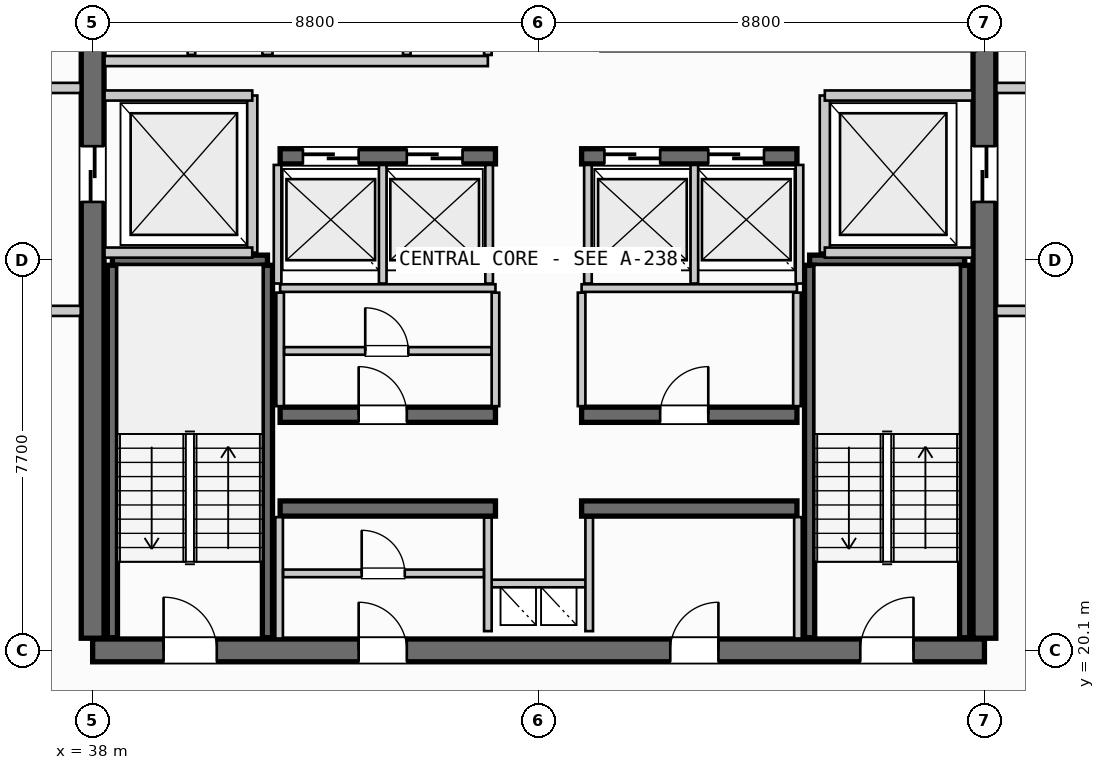
"""IFC4 building model, lengths in metres.
Left out: names, types, materials, properties, quantities, classifications, styles, units other than length and angle.
Written with IfcOpenShell. Run it as: python <this file> out.ifc"""

import sys

from ifc_helpers import new_model, si_unit, direction, frame, frame_2d, origin, place, context, subcontext, project, spatial, rectangle, extrude, source, transform, mapped, element, fill, save


model = new_model("IFC4")
c1 = context("Model", 3, precision=1e-05, world=origin(), true_north=direction((0.0, 1.0)))
c2 = subcontext(c1, "Body", "Model", "MODEL_VIEW")
j1 = project(units=[si_unit("LENGTHUNIT", "METRE"), si_unit("PLANEANGLEUNIT", "RADIAN")], contexts=[c1])
p1 = place(None, origin())
s1 = spatial("IfcSite", under=j1, at=p1, CompositionType="ELEMENT")
p2 = place(p1, origin())
s2 = spatial("IfcBuilding", under=s1, at=p2, CompositionType="ELEMENT")
p3 = place(p2, frame((0.0, 0.0, 273.25)))
s3 = spatial("IfcBuildingStorey", under=s2, at=p3, CompositionType="ELEMENT", Elevation=273.25)
p4 = place(p3, frame((38.0, 20.1, 0.0), z_axis=(0.0, 0.0, 1.0), x_axis=(1.0, 0.0, 0.0)))
e1 = element("IfcWall", 1, at=p4, inside=s3, PredefinedType="SHEAR", context=c2, shape_type="SweptSolid", body=[
    extrude(rectangle(XDim=17.6, YDim=0.45, at=frame_2d((8.8, 0.0))), origin(), (0.0, 0.0, 1.0), 3.21),
])
p5 = place(p4, frame((1.4, 0.0, 0.0)))
e2 = element("IfcOpeningElement", 2, at=p5, cuts=e1, PredefinedType="OPENING", context=c2, shape_type="SweptSolid", body=[
    extrude(rectangle(XDim=1.05, YDim=2.15, at=frame_2d((0.525, 1.075))), frame((0.0, 0.235, 0.0), z_axis=(0.0, -1.0, 0.0), x_axis=(1.0, 0.0, 0.0)), (0.0, 0.0, 1.0), 0.47),
])
p6 = place(p4, frame((15.15, 0.0, 0.0)))
e3 = element("IfcOpeningElement", 3, at=p6, cuts=e1, PredefinedType="OPENING", context=c2, shape_type="SweptSolid", body=[
    extrude(rectangle(XDim=1.05, YDim=2.15, at=frame_2d((0.525, 1.075))), frame((0.0, 0.235, 0.0), z_axis=(0.0, -1.0, 0.0), x_axis=(1.0, 0.0, 0.0)), (0.0, 0.0, 1.0), 0.47),
])
p7 = place(p4, frame((5.25, 0.0, 0.0)))
e4 = element("IfcOpeningElement", 4, at=p7, cuts=e1, PredefinedType="OPENING", context=c2, shape_type="SweptSolid", body=[
    extrude(rectangle(XDim=0.95, YDim=2.15, at=frame_2d((0.475, 1.075))), frame((0.0, 0.235, 0.0), z_axis=(0.0, -1.0, 0.0), x_axis=(1.0, 0.0, 0.0)), (0.0, 0.0, 1.0), 0.47),
])
p8 = place(p4, frame((11.4, 0.0, 0.0)))
e5 = element("IfcOpeningElement", 5, at=p8, cuts=e1, PredefinedType="OPENING", context=c2, shape_type="SweptSolid", body=[
    extrude(rectangle(XDim=0.95, YDim=2.15, at=frame_2d((0.475, 1.075))), frame((0.0, 0.235, 0.0), z_axis=(0.0, -1.0, 0.0), x_axis=(1.0, 0.0, 0.0)), (0.0, 0.0, 1.0), 0.47),
])
p9 = place(p3, frame((38.0, 35.26, 0.0), z_axis=(0.0, 0.0, 1.0), x_axis=(0.0, -1.0, 0.0)))
e6 = element("IfcWall", 6, at=p9, inside=s3, PredefinedType="SHEAR", context=c2, shape_type="SweptSolid", body=[
    extrude(rectangle(XDim=14.92, YDim=0.45, at=frame_2d((7.46, 0.0))), origin(), (0.0, 0.0, 1.0), 3.21),
])
p10 = place(p9, frame((5.21, 0.0, 0.0)))
e7 = element("IfcOpeningElement", 7, at=p10, cuts=e6, PredefinedType="OPENING", context=c2, shape_type="SweptSolid", body=[
    extrude(rectangle(XDim=1.1, YDim=2.2, at=frame_2d((0.55, 1.1))), frame((0.0, 0.235, 0.0), z_axis=(0.0, -1.0, 0.0), x_axis=(1.0, 0.0, 0.0)), (0.0, 0.0, 1.0), 0.47),
])
p11 = place(p3, frame((55.6, 20.34, 0.0), z_axis=(0.0, 0.0, 1.0), x_axis=(0.0, 1.0, 0.0)))
e8 = element("IfcWall", 8, at=p11, inside=s3, PredefinedType="SHEAR", context=c2, shape_type="SweptSolid", body=[
    extrude(rectangle(XDim=14.92, YDim=0.45, at=frame_2d((7.46, 0.0))), origin(), (0.0, 0.0, 1.0), 3.21),
])
p12 = place(p11, frame((12.71, 0.0, 0.0)))
e9 = element("IfcOpeningElement", 9, at=p12, cuts=e8, PredefinedType="OPENING", context=c2, shape_type="SweptSolid", body=[
    extrude(rectangle(XDim=1.05, YDim=2.15, at=frame_2d((0.525, 1.075))), frame((0.0, 0.235, 0.0), z_axis=(0.0, -1.0, 0.0), x_axis=(1.0, 0.0, 0.0)), (0.0, 0.0, 1.0), 0.47),
])
p13 = place(p11, frame((8.61, 0.0, 0.0)))
e10 = element("IfcOpeningElement", 10, at=p13, cuts=e8, PredefinedType="OPENING", context=c2, shape_type="SweptSolid", body=[
    extrude(rectangle(XDim=1.1, YDim=2.2, at=frame_2d((0.55, 1.1))), frame((0.0, 0.235, 0.0), z_axis=(0.0, -1.0, 0.0), x_axis=(1.0, 0.0, 0.0)), (0.0, 0.0, 1.0), 0.47),
])
for number, where, z_axis, x_axis in (
    (11, (41.7, 22.9, 0.0), (0.0, 0.0, 1.0), (1.0, 0.0, 0.0)),
    (12, (47.65, 22.9, 0.0), (0.0, 0.0, 1.0), (1.0, 0.0, 0.0)),
):
    element("IfcWall", number, at=place(p3, frame(where, z_axis=z_axis, x_axis=x_axis)), inside=s3, PredefinedType="SHEAR", context=c2, shape_type="SweptSolid", body=[
        extrude(rectangle(XDim=4.25, YDim=0.3, at=frame_2d((2.125, 0.0))), origin(), (0.0, 0.0, 1.0), 3.21),
    ])
p14 = place(p3, frame((41.7, 24.75, 0.0), z_axis=(0.0, 0.0, 1.0), x_axis=(1.0, 0.0, 0.0)))
e13 = element("IfcWall", 13, at=p14, inside=s3, PredefinedType="SHEAR", context=c2, shape_type="SweptSolid", body=[
    extrude(rectangle(XDim=4.25, YDim=0.3, at=frame_2d((2.125, 0.0))), origin(), (0.0, 0.0, 1.0), 3.21),
])
p15 = place(p14, frame((1.55, 0.0, 0.0)))
e14 = element("IfcOpeningElement", 14, at=p15, cuts=e13, PredefinedType="OPENING", context=c2, shape_type="SweptSolid", body=[
    extrude(rectangle(XDim=0.95, YDim=2.15, at=frame_2d((0.475, 1.075))), frame((0.0, 0.16, 0.0), z_axis=(0.0, -1.0, 0.0), x_axis=(1.0, 0.0, 0.0)), (0.0, 0.0, 1.0), 0.32),
])
p16 = place(p3, frame((47.65, 24.75, 0.0), z_axis=(0.0, 0.0, 1.0), x_axis=(1.0, 0.0, 0.0)))
e15 = element("IfcWall", 15, at=p16, inside=s3, PredefinedType="SHEAR", context=c2, shape_type="SweptSolid", body=[
    extrude(rectangle(XDim=4.25, YDim=0.3, at=frame_2d((2.125, 0.0))), origin(), (0.0, 0.0, 1.0), 3.21),
])
p17 = place(p16, frame((1.55, 0.0, 0.0)))
e16 = element("IfcOpeningElement", 16, at=p17, cuts=e15, PredefinedType="OPENING", context=c2, shape_type="SweptSolid", body=[
    extrude(rectangle(XDim=0.95, YDim=2.15, at=frame_2d((0.475, 1.075))), frame((0.0, 0.16, 0.0), z_axis=(0.0, -1.0, 0.0), x_axis=(1.0, 0.0, 0.0)), (0.0, 0.0, 1.0), 0.32),
])
p18 = place(p3, frame((41.7, 29.85, 0.0), z_axis=(0.0, 0.0, 1.0), x_axis=(1.0, 0.0, 0.0)))
e17 = element("IfcWall", 17, at=p18, inside=s3, PredefinedType="SHEAR", context=c2, shape_type="SweptSolid", body=[
    extrude(rectangle(XDim=4.25, YDim=0.3, at=frame_2d((2.125, 0.0))), origin(), (0.0, 0.0, 1.0), 3.21),
])
p19 = place(p18, frame((0.45, 0.0, 0.0)))
e18 = element("IfcOpeningElement", 18, at=p19, cuts=e17, PredefinedType="OPENING", context=c2, shape_type="SweptSolid", body=[
    extrude(rectangle(XDim=1.1, YDim=2.2, at=frame_2d((0.55, 1.1))), frame((0.0, 0.16, 0.0), z_axis=(0.0, -1.0, 0.0), x_axis=(1.0, 0.0, 0.0)), (0.0, 0.0, 1.0), 0.32),
])
p20 = place(p18, frame((2.5, 0.0, 0.0)))
e19 = element("IfcOpeningElement", 19, at=p20, cuts=e17, PredefinedType="OPENING", context=c2, shape_type="SweptSolid", body=[
    extrude(rectangle(XDim=1.1, YDim=2.2, at=frame_2d((0.55, 1.1))), frame((0.0, 0.16, 0.0), z_axis=(0.0, -1.0, 0.0), x_axis=(1.0, 0.0, 0.0)), (0.0, 0.0, 1.0), 0.32),
])
p21 = place(p3, frame((47.65, 29.85, 0.0), z_axis=(0.0, 0.0, 1.0), x_axis=(1.0, 0.0, 0.0)))
e20 = element("IfcWall", 20, at=p21, inside=s3, PredefinedType="SHEAR", context=c2, shape_type="SweptSolid", body=[
    extrude(rectangle(XDim=4.25, YDim=0.3, at=frame_2d((2.125, 0.0))), origin(), (0.0, 0.0, 1.0), 3.21),
])
p22 = place(p21, frame((0.45, 0.0, 0.0)))
e21 = element("IfcOpeningElement", 21, at=p22, cuts=e20, PredefinedType="OPENING", context=c2, shape_type="SweptSolid", body=[
    extrude(rectangle(XDim=1.1, YDim=2.2, at=frame_2d((0.55, 1.1))), frame((0.0, 0.16, 0.0), z_axis=(0.0, -1.0, 0.0), x_axis=(1.0, 0.0, 0.0)), (0.0, 0.0, 1.0), 0.32),
])
p23 = place(p21, frame((2.5, 0.0, 0.0)))
e22 = element("IfcOpeningElement", 22, at=p23, cuts=e20, PredefinedType="OPENING", context=c2, shape_type="SweptSolid", body=[
    extrude(rectangle(XDim=1.1, YDim=2.2, at=frame_2d((0.55, 1.1))), frame((0.0, 0.16, 0.0), z_axis=(0.0, -1.0, 0.0), x_axis=(1.0, 0.0, 0.0)), (0.0, 0.0, 1.0), 0.32),
])
p24 = place(p3, frame((38.39, 27.8, 0.0), z_axis=(0.0, 0.0, 1.0), x_axis=(1.0, 0.0, 0.0)))
e23 = element("IfcWall", 23, at=p24, inside=s3, PredefinedType="SHEAR", context=c2, shape_type="SweptSolid", body=[
    extrude(rectangle(XDim=3.06, YDim=0.2, at=frame_2d((1.53, 0.0))), origin(), (0.0, 0.0, 1.0), 3.21),
])
for number, where, z_axis, x_axis in (
    (24, (41.45, 27.7, 0.0), (0.0, 0.0, 1.0), (0.0, -1.0, 0.0)),
    (25, (38.39, 20.35, 0.0), (0.0, 0.0, 1.0), (0.0, 1.0, 0.0)),
):
    element("IfcWall", number, at=place(p3, frame(where, z_axis=z_axis, x_axis=x_axis)), inside=s3, PredefinedType="SHEAR", context=c2, shape_type="SweptSolid", body=[
        extrude(rectangle(XDim=7.35, YDim=0.2, at=frame_2d((3.675, 0.0))), origin(), (0.0, 0.0, 1.0), 3.21),
    ])
p25 = place(p3, frame((52.15, 27.8, 0.0), z_axis=(0.0, 0.0, 1.0), x_axis=(1.0, 0.0, 0.0)))
e26 = element("IfcWall", 26, at=p25, inside=s3, PredefinedType="SHEAR", context=c2, shape_type="SweptSolid", body=[
    extrude(rectangle(XDim=3.06, YDim=0.2, at=frame_2d((1.53, 0.0))), origin(), (0.0, 0.0, 1.0), 3.21),
])
for number, where, z_axis, x_axis in (
    (27, (55.21, 27.7, 0.0), (0.0, 0.0, 1.0), (0.0, -1.0, 0.0)),
    (28, (52.15, 20.35, 0.0), (0.0, 0.0, 1.0), (0.0, 1.0, 0.0)),
):
    element("IfcWall", number, at=place(p3, frame(where, z_axis=z_axis, x_axis=x_axis)), inside=s3, PredefinedType="SHEAR", context=c2, shape_type="SweptSolid", body=[
        extrude(rectangle(XDim=7.35, YDim=0.2, at=frame_2d((3.675, 0.0))), origin(), (0.0, 0.0, 1.0), 3.21),
    ])
p26 = place(p3, frame((45.8, 21.42, 0.0), z_axis=(0.0, 0.0, 1.0), x_axis=(1.0, 0.0, 0.0)))
e29 = element("IfcWall", 29, at=p26, inside=s3, PredefinedType="PARTITIONING", context=c2, shape_type="SweptSolid", body=[
    extrude(rectangle(XDim=2.0, YDim=0.15, at=frame_2d((1.0, 0.0))), origin(), (0.0, 0.0, 1.0), 2.595),
])
for number, where, z_axis, x_axis in (
    (30, (45.8, 20.48, 0.0), (0.0, 0.0, 1.0), (0.0, 1.0, 0.0)),
    (31, (47.8, 20.48, 0.0), (0.0, 0.0, 1.0), (0.0, 1.0, 0.0)),
):
    element("IfcWall", number, at=place(p3, frame(where, z_axis=z_axis, x_axis=x_axis)), inside=s3, PredefinedType="PARTITIONING", context=c2, shape_type="SweptSolid", body=[
        extrude(rectangle(XDim=2.24, YDim=0.15, at=frame_2d((1.12, 0.0))), origin(), (0.0, 0.0, 1.0), 2.595),
    ])
p27 = place(p3, frame((41.15, 27.95, 0.0), z_axis=(0.0, 0.0, 1.0), x_axis=(0.0, 1.0, 0.0)))
e32 = element("IfcWall", 32, at=p27, inside=s3, PredefinedType="PARTITIONING", context=c2, shape_type="SweptSolid", body=[
    extrude(rectangle(XDim=3.1, YDim=0.2, at=frame_2d((1.55, 0.0))), origin(), (0.0, 0.0, 1.0), 2.595),
])
for number, where, z_axis, x_axis in (
    (33, (38.235, 27.95, 0.0), (0.0, 0.0, 1.0), (1.0, 0.0, 0.0)),
    (34, (38.235, 31.05, 0.0), (0.0, 0.0, 1.0), (1.0, 0.0, 0.0)),
):
    element("IfcWall", number, at=place(p3, frame(where, z_axis=z_axis, x_axis=x_axis)), inside=s3, PredefinedType="PARTITIONING", context=c2, shape_type="SweptSolid", body=[
        extrude(rectangle(XDim=2.915, YDim=0.2, at=frame_2d((1.458, 0.0))), origin(), (0.0, 0.0, 1.0), 2.595),
    ])
for number, where, z_axis, x_axis in (
    (35, (34.5, 26.8, 0.0), (0.0, 0.0, 1.0), (1.0, 0.0, 0.0)),
    (36, (34.5, 31.2, 0.0), (0.0, 0.0, 1.0), (1.0, 0.0, 0.0)),
):
    element("IfcWall", number, at=place(p3, frame(where, z_axis=z_axis, x_axis=x_axis)), inside=s3, PredefinedType="PARTITIONING", context=c2, shape_type="SweptSolid", body=[
        extrude(rectangle(XDim=3.265, YDim=0.2, at=frame_2d((1.632, 0.0))), origin(), (0.0, 0.0, 1.0), 2.595),
    ])
p28 = place(p3, frame((52.45, 27.95, 0.0), z_axis=(0.0, 0.0, 1.0), x_axis=(0.0, 1.0, 0.0)))
e37 = element("IfcWall", 37, at=p28, inside=s3, PredefinedType="PARTITIONING", context=c2, shape_type="SweptSolid", body=[
    extrude(rectangle(XDim=3.1, YDim=0.2, at=frame_2d((1.55, 0.0))), origin(), (0.0, 0.0, 1.0), 2.595),
])
for number, where, z_axis, x_axis in (
    (38, (52.45, 27.95, 0.0), (0.0, 0.0, 1.0), (1.0, 0.0, 0.0)),
    (39, (52.45, 31.05, 0.0), (0.0, 0.0, 1.0), (1.0, 0.0, 0.0)),
):
    element("IfcWall", number, at=place(p3, frame(where, z_axis=z_axis, x_axis=x_axis)), inside=s3, PredefinedType="PARTITIONING", context=c2, shape_type="SweptSolid", body=[
        extrude(rectangle(XDim=2.915, YDim=0.2, at=frame_2d((1.458, 0.0))), origin(), (0.0, 0.0, 1.0), 2.595),
    ])
for number, where, z_axis, x_axis in (
    (40, (55.835, 26.8, 0.0), (0.0, 0.0, 1.0), (1.0, 0.0, 0.0)),
    (41, (55.835, 31.2, 0.0), (0.0, 0.0, 1.0), (1.0, 0.0, 0.0)),
):
    element("IfcWall", number, at=place(p3, frame(where, z_axis=z_axis, x_axis=x_axis)), inside=s3, PredefinedType="PARTITIONING", context=c2, shape_type="SweptSolid", body=[
        extrude(rectangle(XDim=3.265, YDim=0.2, at=frame_2d((1.633, 0.0))), origin(), (0.0, 0.0, 1.0), 2.595),
    ])
for number, where, z_axis, x_axis in (
    (42, (41.68, 20.335, 0.0), (0.0, 0.0, 1.0), (0.0, 1.0, 0.0)),
    (43, (51.92, 20.335, 0.0), (0.0, 0.0, 1.0), (0.0, 1.0, 0.0)),
):
    element("IfcWall", number, at=place(p3, frame(where, z_axis=z_axis, x_axis=x_axis)), inside=s3, PredefinedType="PARTITIONING", context=c2, shape_type="SweptSolid", body=[
        extrude(rectangle(XDim=2.395, YDim=0.15, at=frame_2d((1.198, 0.0))), origin(), (0.0, 0.0, 1.0), 2.595),
    ])
p29 = place(p3, frame((41.76, 21.62, 0.0), z_axis=(0.0, 0.0, 1.0), x_axis=(1.0, 0.0, 0.0)))
e44 = element("IfcWall", 44, at=p29, inside=s3, PredefinedType="PARTITIONING", context=c2, shape_type="SweptSolid", body=[
    extrude(rectangle(XDim=3.96, YDim=0.15, at=frame_2d((1.98, 0.0))), origin(), (0.0, 0.0, 1.0), 2.595),
])
p30 = place(p29, frame((1.55, 0.0, 0.0)))
e45 = element("IfcOpeningElement", 45, at=p30, cuts=e44, PredefinedType="OPENING", context=c2, shape_type="SweptSolid", body=[
    extrude(rectangle(XDim=0.85, YDim=2.15, at=frame_2d((0.425, 1.075))), frame((0.0, 0.085, 0.0), z_axis=(0.0, -1.0, 0.0), x_axis=(1.0, 0.0, 0.0)), (0.0, 0.0, 1.0), 0.17),
])
for number, where, z_axis, x_axis in (
    (46, (41.7, 27.25, 0.0), (0.0, 0.0, 1.0), (1.0, 0.0, 0.0)),
    (47, (47.65, 27.25, 0.0), (0.0, 0.0, 1.0), (1.0, 0.0, 0.0)),
):
    element("IfcWall", number, at=place(p3, frame(where, z_axis=z_axis, x_axis=x_axis)), inside=s3, PredefinedType="PARTITIONING", context=c2, shape_type="SweptSolid", body=[
        extrude(rectangle(XDim=4.25, YDim=0.15, at=frame_2d((2.125, 0.0))), origin(), (0.0, 0.0, 1.0), 2.595),
    ])
for number, where, z_axis, x_axis in (
    (48, (41.7, 24.92, 0.0), (0.0, 0.0, 1.0), (0.0, 1.0, 0.0)),
    (49, (45.95, 24.92, 0.0), (0.0, 0.0, 1.0), (0.0, 1.0, 0.0)),
    (50, (47.65, 24.92, 0.0), (0.0, 0.0, 1.0), (0.0, 1.0, 0.0)),
    (51, (51.9, 24.92, 0.0), (0.0, 0.0, 1.0), (0.0, 1.0, 0.0)),
):
    element("IfcWall", number, at=place(p3, frame(where, z_axis=z_axis, x_axis=x_axis)), inside=s3, PredefinedType="PARTITIONING", context=c2, shape_type="SweptSolid", body=[
        extrude(rectangle(XDim=2.24, YDim=0.15, at=frame_2d((1.12, 0.0))), origin(), (0.0, 0.0, 1.0), 2.595),
    ])
p31 = place(p3, frame((41.78, 26.01, 0.0), z_axis=(0.0, 0.0, 1.0), x_axis=(1.0, 0.0, 0.0)))
e52 = element("IfcWall", 52, at=p31, inside=s3, PredefinedType="PARTITIONING", context=c2, shape_type="SweptSolid", body=[
    extrude(rectangle(XDim=4.09, YDim=0.15, at=frame_2d((2.045, 0.0))), origin(), (0.0, 0.0, 1.0), 2.595),
])
p32 = place(p31, frame((1.6, 0.0, 0.0)))
e53 = element("IfcOpeningElement", 53, at=p32, cuts=e52, PredefinedType="OPENING", context=c2, shape_type="SweptSolid", body=[
    extrude(rectangle(XDim=0.85, YDim=2.15, at=frame_2d((0.425, 1.075))), frame((0.0, 0.085, 0.0), z_axis=(0.0, -1.0, 0.0), x_axis=(1.0, 0.0, 0.0)), (0.0, 0.0, 1.0), 0.17),
])
for number, where, z_axis, x_axis in (
    (54, (41.65, 27.34, 0.0), (0.0, 0.0, 1.0), (0.0, 1.0, 0.0)),
    (55, (43.725, 27.34, 0.0), (0.0, 0.0, 1.0), (0.0, 1.0, 0.0)),
    (56, (45.825, 27.34, 0.0), (0.0, 0.0, 1.0), (0.0, 1.0, 0.0)),
    (57, (47.775, 27.34, 0.0), (0.0, 0.0, 1.0), (0.0, 1.0, 0.0)),
    (58, (49.875, 27.34, 0.0), (0.0, 0.0, 1.0), (0.0, 1.0, 0.0)),
    (59, (51.95, 27.34, 0.0), (0.0, 0.0, 1.0), (0.0, 1.0, 0.0)),
):
    element("IfcWall", number, at=place(p3, frame(where, z_axis=z_axis, x_axis=x_axis)), inside=s3, PredefinedType="PARTITIONING", context=c2, shape_type="SweptSolid", body=[
        extrude(rectangle(XDim=2.34, YDim=0.15, at=frame_2d((1.17, 0.0))), origin(), (0.0, 0.0, 1.0), 2.595),
    ])
p33 = place(p3, frame((41.45, 31.85, 0.0), z_axis=(0.0, 0.0, 1.0), x_axis=(0.0, 1.0, 0.0)))
e60 = element("IfcWall", 60, at=p33, inside=s3, PredefinedType="PARTITIONING", context=c2, shape_type="SweptSolid", body=[
    extrude(rectangle(XDim=3.415, YDim=0.2, at=frame_2d((1.708, 0.0))), origin(), (0.0, 0.0, 1.0), 2.595),
])
p34 = place(p3, frame((38.235, 31.73, 0.0), z_axis=(0.0, 0.0, 1.0), x_axis=(1.0, 0.0, 0.0)))
e61 = element("IfcWall", 61, at=p34, inside=s3, PredefinedType="PARTITIONING", context=c2, shape_type="SweptSolid", body=[
    extrude(rectangle(XDim=7.565, YDim=0.2, at=frame_2d((3.782, 0.0))), origin(), (0.0, 0.0, 1.0), 2.595),
])
for number, where, z_axis, x_axis in (
    (62, (45.8, 31.85, 0.0), (0.0, 0.0, 1.0), (0.0, 1.0, 0.0)),
    (63, (39.95, 31.85, 0.0), (0.0, 0.0, 1.0), (0.0, 1.0, 0.0)),
):
    element("IfcWall", number, at=place(p3, frame(where, z_axis=z_axis, x_axis=x_axis)), inside=s3, PredefinedType="PARTITIONING", context=c2, shape_type="SweptSolid", body=[
        extrude(rectangle(XDim=3.415, YDim=0.15, at=frame_2d((1.708, 0.0))), origin(), (0.0, 0.0, 1.0), 2.595),
    ])
p35 = place(p3, frame((44.2, 31.85, 0.0), z_axis=(0.0, 0.0, 1.0), x_axis=(0.0, 1.0, 0.0)))
e64 = element("IfcWall", 64, at=p35, inside=s3, PredefinedType="PLUMBINGWALL", context=c2, shape_type="SweptSolid", body=[
    extrude(rectangle(XDim=3.415, YDim=0.15, at=frame_2d((1.708, 0.0))), origin(), (0.0, 0.0, 1.0), 2.595),
])
m1 = source(origin(), c2, "Body", "SweptSolid", [
    extrude(rectangle(XDim=1.05, YDim=2.15, at=frame_2d((0.525, 1.075))), frame((0.0, 0.025, 0.0), z_axis=(0.0, -1.0, 0.0), x_axis=(1.0, 0.0, 0.0)), (0.0, 0.0, 1.0), 0.05),
])
p36 = place(p5, origin())
e65 = element("IfcDoor", 65, at=p36, inside=s3, OperationType="SINGLE_SWING_LEFT", PredefinedType="DOOR", context=c2, shape_type="MappedRepresentation", body=[
    mapped(m1, transform((0.0, 0.0, 0.0), scale=1.0)),
])
fill(e2, e65)
p37 = place(p6, origin())
e66 = element("IfcDoor", 66, at=p37, inside=s3, OperationType="SINGLE_SWING_RIGHT", PredefinedType="DOOR", context=c2, shape_type="MappedRepresentation", body=[
    mapped(m1, transform((0.0, 0.0, 0.0), scale=1.0)),
])
fill(e3, e66)
m2 = source(origin(), c2, "Body", "SweptSolid", [
    extrude(rectangle(XDim=1.1, YDim=2.2, at=frame_2d((0.55, 1.1))), frame((0.0, 0.025, 0.0), z_axis=(0.0, -1.0, 0.0), x_axis=(1.0, 0.0, 0.0)), (0.0, 0.0, 1.0), 0.05),
])
p38 = place(p10, origin())
e67 = element("IfcDoor", 67, at=p38, inside=s3, OperationType="SLIDING_TO_LEFT", PredefinedType="DOOR", context=c2, shape_type="MappedRepresentation", body=[
    mapped(m2, transform((0.0, 0.0, 0.0), scale=1.0)),
])
fill(e7, e67)
p39 = place(p13, origin())
e68 = element("IfcDoor", 68, at=p39, inside=s3, OperationType="SLIDING_TO_RIGHT", PredefinedType="DOOR", context=c2, shape_type="MappedRepresentation", body=[
    mapped(m2, transform((0.0, 0.0, 0.0), scale=1.0)),
])
fill(e10, e68)
m3 = source(origin(), c2, "Body", "SweptSolid", [
    extrude(rectangle(XDim=0.95, YDim=2.15, at=frame_2d((0.475, 1.075))), frame((0.0, 0.025, 0.0), z_axis=(0.0, -1.0, 0.0), x_axis=(1.0, 0.0, 0.0)), (0.0, 0.0, 1.0), 0.05),
])
p40 = place(p7, origin())
e69 = element("IfcDoor", 69, at=p40, inside=s3, OperationType="SINGLE_SWING_LEFT", PredefinedType="DOOR", context=c2, shape_type="MappedRepresentation", body=[
    mapped(m3, transform((0.0, 0.0, 0.0), scale=1.0)),
])
fill(e4, e69)
p41 = place(p8, origin())
e70 = element("IfcDoor", 70, at=p41, inside=s3, OperationType="SINGLE_SWING_RIGHT", PredefinedType="DOOR", context=c2, shape_type="MappedRepresentation", body=[
    mapped(m3, transform((0.0, 0.0, 0.0), scale=1.0)),
])
fill(e5, e70)
p42 = place(p15, origin())
e71 = element("IfcDoor", 71, at=p42, inside=s3, OperationType="SINGLE_SWING_LEFT", PredefinedType="DOOR", context=c2, shape_type="MappedRepresentation", body=[
    mapped(m3, transform((0.0, 0.0, 0.0), scale=1.0)),
])
fill(e14, e71)
p43 = place(p17, origin())
e72 = element("IfcDoor", 72, at=p43, inside=s3, OperationType="SINGLE_SWING_RIGHT", PredefinedType="DOOR", context=c2, shape_type="MappedRepresentation", body=[
    mapped(m3, transform((0.0, 0.0, 0.0), scale=1.0)),
])
fill(e16, e72)
p44 = place(p19, origin())
e73 = element("IfcDoor", 73, at=p44, inside=s3, OperationType="SLIDING_TO_LEFT", PredefinedType="DOOR", context=c2, shape_type="MappedRepresentation", body=[
    mapped(m2, transform((0.0, 0.0, 0.0), scale=1.0)),
])
fill(e18, e73)
p45 = place(p20, origin())
e74 = element("IfcDoor", 74, at=p45, inside=s3, OperationType="SLIDING_TO_LEFT", PredefinedType="DOOR", context=c2, shape_type="MappedRepresentation", body=[
    mapped(m2, transform((0.0, 0.0, 0.0), scale=1.0)),
])
fill(e19, e74)
p46 = place(p22, origin())
e75 = element("IfcDoor", 75, at=p46, inside=s3, OperationType="SLIDING_TO_LEFT", PredefinedType="DOOR", context=c2, shape_type="MappedRepresentation", body=[
    mapped(m2, transform((0.0, 0.0, 0.0), scale=1.0)),
])
fill(e21, e75)
p47 = place(p23, origin())
e76 = element("IfcDoor", 76, at=p47, inside=s3, OperationType="SLIDING_TO_LEFT", PredefinedType="DOOR", context=c2, shape_type="MappedRepresentation", body=[
    mapped(m2, transform((0.0, 0.0, 0.0), scale=1.0)),
])
fill(e22, e76)
m4 = source(origin(), c2, "Body", "SweptSolid", [
    extrude(rectangle(XDim=0.85, YDim=2.15, at=frame_2d((0.425, 1.075))), frame((0.0, 0.025, 0.0), z_axis=(0.0, -1.0, 0.0), x_axis=(1.0, 0.0, 0.0)), (0.0, 0.0, 1.0), 0.05),
])
p48 = place(p30, origin())
e77 = element("IfcDoor", 77, at=p48, inside=s3, OperationType="SINGLE_SWING_LEFT", PredefinedType="DOOR", context=c2, shape_type="MappedRepresentation", body=[
    mapped(m4, transform((0.0, 0.0, 0.0), scale=1.0)),
])
fill(e45, e77)
p49 = place(p32, origin())
e78 = element("IfcDoor", 78, at=p49, inside=s3, OperationType="SINGLE_SWING_LEFT", PredefinedType="DOOR", context=c2, shape_type="MappedRepresentation", body=[
    mapped(m4, transform((0.0, 0.0, 0.0), scale=1.0)),
])
fill(e53, e78)
save(model, sys.argv[1])
